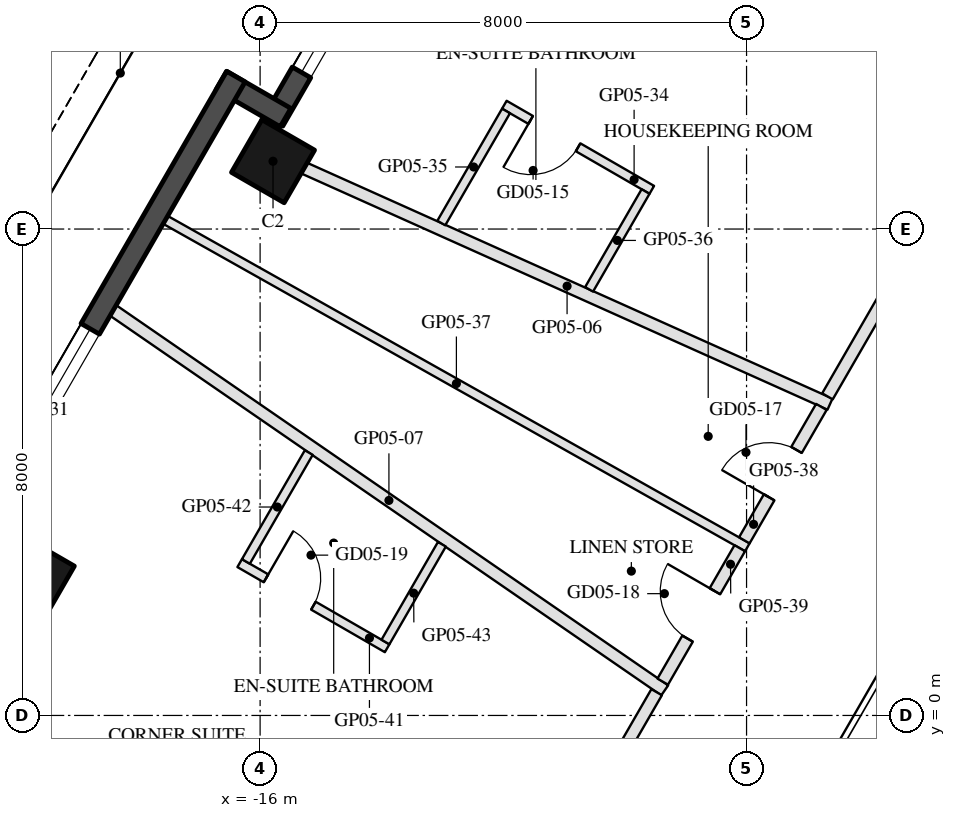
"""IFC4 building model, lengths in metres.
Left out: names, types, materials, properties, quantities, classifications, styles, units other than length and angle.
Written with IfcOpenShell. Run it as: python <this file> out.ifc"""

import sys

from ifc_helpers import new_model, si_unit, direction, frame, frame_2d, origin, origin_2d, place, context, subcontext, project, spatial, rectangle, hollow_rectangle, extrude, element, fill, save


model = new_model("IFC4")
c1 = context("Model", 3, precision=1e-05, world=origin(), true_north=direction((0.0, 1.0)))
c2 = subcontext(c1, "Body", "Model", "MODEL_VIEW")
j1 = project(units=[si_unit("LENGTHUNIT", "METRE"), si_unit("PLANEANGLEUNIT", "RADIAN")], contexts=[c1])
p1 = place(None, origin())
s1 = spatial("IfcSite", under=j1, at=p1, CompositionType="ELEMENT")
p2 = place(p1, origin())
s2 = spatial("IfcBuilding", under=s1, at=p2, CompositionType="ELEMENT")
p3 = place(p2, frame((0.0, 0.0, 79.8)))
s3 = spatial("IfcBuildingStorey", under=s2, at=p3, CompositionType="ELEMENT", Elevation=79.8)
for number, where, z_axis, x_axis in (
    (1, (-15.788, 9.115, 0.0), (0.0, 0.0, 1.0), (0.5, 0.866, 0.0)),
    (2, (-19.738, 2.273, 0.0), (0.0, 0.0, 1.0), (0.5, 0.866, 0.0)),
):
    element("IfcColumn", number, at=place(p3, frame(where, z_axis=z_axis, x_axis=x_axis)), inside=s3, PredefinedType="COLUMN", context=c2, shape_type="SweptSolid", body=[
        extrude(hollow_rectangle(XDim=1.0, YDim=1.0, WallThickness=0.045, at=origin_2d()), origin(), (0.0, 0.0, 1.0), 3.7),
    ])
p4 = place(p3, frame((-12.409, 15.617, 0.0), z_axis=(0.0, 0.0, 1.0), x_axis=(-0.500003597184, -0.866023326939, 0.0)))
e3 = element("IfcWall", 3, at=p4, inside=s3, PredefinedType="SOLIDWALL", context=c2, shape_type="SweptSolid", body=[
    extrude(rectangle(XDim=6.74, YDim=0.35, at=frame_2d((3.37, 0.0))), origin(), (0.0, 0.0, 1.0), 3.55),
])
p5 = place(p4, frame((0.32, 0.0, 0.3)))
e4 = element("IfcOpeningElement", 4, at=p5, cuts=e3, PredefinedType="OPENING", context=c2, shape_type="SweptSolid", body=[
    extrude(rectangle(XDim=2.6, YDim=2.65, at=frame_2d((1.3, 1.325))), frame((0.0, 0.185, 0.0), z_axis=(0.0, -1.0, 0.0), x_axis=(1.0, 0.0, 0.0)), (0.0, 0.0, 1.0), 0.37),
])
p6 = place(p4, frame((3.22, 0.0, 0.3)))
e5 = element("IfcOpeningElement", 5, at=p6, cuts=e3, PredefinedType="OPENING", context=c2, shape_type="SweptSolid", body=[
    extrude(rectangle(XDim=2.6, YDim=2.65, at=frame_2d((1.3, 1.325))), frame((0.0, 0.185, 0.0), z_axis=(0.0, -1.0, 0.0), x_axis=(1.0, 0.0, 0.0)), (0.0, 0.0, 1.0), 0.37),
])
p7 = place(p3, frame((-15.581, 9.833, 0.0), z_axis=(0.0, 0.0, 1.0), x_axis=(-0.866055662726, 0.499947586314, 0.0)))
e6 = element("IfcWall", 6, at=p7, inside=s3, PredefinedType="SOLIDWALL", context=c2, shape_type="SweptSolid", body=[
    extrude(rectangle(XDim=1.22, YDim=0.35, at=frame_2d((0.61, 0.0))), origin(), (0.0, 0.0, 1.0), 3.55),
])
p8 = place(p3, frame((-16.398, 10.507, 0.0), z_axis=(0.0, 0.0, 1.0), x_axis=(-0.499999142773, -0.866025898704, 0.0)))
e7 = element("IfcWall", 7, at=p8, inside=s3, PredefinedType="SOLIDWALL", context=c2, shape_type="SweptSolid", body=[
    extrude(rectangle(XDim=9.7, YDim=0.35, at=frame_2d((4.85, 0.0))), origin(), (0.0, 0.0, 1.0), 3.55),
])
p9 = place(p8, frame((4.79, 0.0, 0.3)))
e8 = element("IfcOpeningElement", 8, at=p9, cuts=e7, PredefinedType="OPENING", context=c2, shape_type="SweptSolid", body=[
    extrude(rectangle(XDim=3.1, YDim=2.65, at=frame_2d((1.55, 1.325))), frame((0.0, 0.185, 0.0), z_axis=(0.0, -1.0, 0.0), x_axis=(1.0, 0.0, 0.0)), (0.0, 0.0, 1.0), 0.37),
])
p10 = place(p3, frame((-15.275, 9.002, 0.0), z_axis=(0.0, 0.0, 1.0), x_axis=(0.912310970981, -0.409498097954, 0.0)))
e9 = element("IfcWall", 9, at=p10, inside=s3, PredefinedType="PARTITIONING", context=c2, shape_type="SweptSolid", body=[
    extrude(rectangle(XDim=9.479, YDim=0.2, at=frame_2d((4.74, 0.0))), origin(), (0.0, 0.0, 1.0), 2.95),
])
p11 = place(p3, frame((-18.417, 6.661, 0.0), z_axis=(0.0, 0.0, 1.0), x_axis=(0.823524858714, -0.56728018393, 0.0)))
e10 = element("IfcWall", 10, at=p11, inside=s3, PredefinedType="PARTITIONING", context=c2, shape_type="SweptSolid", body=[
    extrude(rectangle(XDim=11.015, YDim=0.2, at=frame_2d((5.507, 0.0))), origin(), (0.0, 0.0, 1.0), 2.95),
])
p12 = place(p3, frame((-6.669, 5.249, 0.0), z_axis=(0.0, 0.0, 1.0), x_axis=(0.499992114976, 0.866029956157, 0.0)))
e11 = element("IfcWall", 11, at=p12, inside=s3, PredefinedType="PARTITIONING", context=c2, shape_type="SweptSolid", body=[
    extrude(rectangle(XDim=8.778, YDim=0.2, at=frame_2d((4.389, 0.0))), origin(), (0.0, 0.0, 1.0), 2.95),
])
p13 = place(p12, frame((3.889, 0.0, 0.0)))
e12 = element("IfcOpeningElement", 12, at=p13, cuts=e11, PredefinedType="OPENING", context=c2, shape_type="SweptSolid", body=[
    extrude(rectangle(XDim=1.0, YDim=2.1, at=frame_2d((0.5, 1.05))), frame((0.0, 0.11, 0.0), z_axis=(0.0, -1.0, 0.0), x_axis=(1.0, 0.0, 0.0)), (0.0, 0.0, 1.0), 0.22),
])
p14 = place(p3, frame((-9.558, 8.645, 0.0), z_axis=(0.0, 0.0, 1.0), x_axis=(-0.866034573852, 0.49998411664, 0.0)))
e13 = element("IfcWall", 13, at=p14, inside=s3, PredefinedType="PARTITIONING", context=c2, shape_type="SweptSolid", body=[
    extrude(rectangle(XDim=2.8, YDim=0.15, at=frame_2d((1.4, 0.0))), origin(), (0.0, 0.0, 1.0), 3.55),
])
p15 = place(p14, frame((1.4, 0.0, 0.0)))
e14 = element("IfcOpeningElement", 14, at=p15, cuts=e13, PredefinedType="OPENING", context=c2, shape_type="SweptSolid", body=[
    extrude(rectangle(XDim=0.9, YDim=2.1, at=frame_2d((0.45, 1.05))), frame((0.0, 0.085, 0.0), z_axis=(0.0, -1.0, 0.0), x_axis=(1.0, 0.0, 0.0)), (0.0, 0.0, 1.0), 0.17),
])
p16 = place(p3, frame((-11.956, 9.942, 0.0), z_axis=(0.0, 0.0, 1.0), x_axis=(-0.50001378257, -0.866017446268, 0.0)))
e15 = element("IfcWall", 15, at=p16, inside=s3, PredefinedType="PARTITIONING", context=c2, shape_type="SweptSolid", body=[
    extrude(rectangle(XDim=2.128, YDim=0.15, at=frame_2d((1.064, 0.0))), origin(), (0.0, 0.0, 1.0), 3.55),
])
p17 = place(p3, frame((-9.661, 8.617, 0.0), z_axis=(0.0, 0.0, 1.0), x_axis=(-0.499984136491, -0.866034562392, 0.0)))
e16 = element("IfcWall", 16, at=p17, inside=s3, PredefinedType="PARTITIONING", context=c2, shape_type="SweptSolid", body=[
    extrude(rectangle(XDim=1.857, YDim=0.15, at=frame_2d((0.929, 0.0))), origin(), (0.0, 0.0, 1.0), 3.55),
])
p18 = place(p3, frame((-17.557, 8.15, 0.0), z_axis=(0.0, 0.0, 1.0), x_axis=(0.87154168957, -0.490321408202, 0.0)))
e17 = element("IfcWall", 17, at=p18, inside=s3, PredefinedType="PARTITIONING", context=c2, shape_type="SweptSolid", body=[
    extrude(rectangle(XDim=10.981, YDim=0.15, at=frame_2d((5.49, 0.0))), origin(), (0.0, 0.0, 1.0), 2.96),
])
p19 = place(p3, frame((-8.037, 2.88, 0.0), z_axis=(0.0, 0.0, 1.0), x_axis=(0.500025521233, 0.866010668592, 0.0)))
e18 = element("IfcWall", 18, at=p19, inside=s3, PredefinedType="PARTITIONING", context=c2, shape_type="SweptSolid", body=[
    extrude(rectangle(XDim=2.533, YDim=0.2, at=frame_2d((1.267, 0.0))), origin(), (0.0, 0.0, 1.0), 2.95),
])
p20 = place(p19, frame((0.817, 0.0, 0.0)))
e19 = element("IfcOpeningElement", 19, at=p20, cuts=e18, PredefinedType="OPENING", context=c2, shape_type="SweptSolid", body=[
    extrude(rectangle(XDim=0.9, YDim=2.1, at=frame_2d((0.45, 1.05))), frame((0.0, 0.11, 0.0), z_axis=(0.0, -1.0, 0.0), x_axis=(1.0, 0.0, 0.0)), (0.0, 0.0, 1.0), 0.22),
])
p21 = place(p3, frame((-9.378, 0.556, 0.0), z_axis=(0.0, 0.0, 1.0), x_axis=(0.499983796486, 0.866034758685, 0.0)))
e20 = element("IfcWall", 20, at=p21, inside=s3, PredefinedType="PARTITIONING", context=c2, shape_type="SweptSolid", body=[
    extrude(rectangle(XDim=2.534, YDim=0.2, at=frame_2d((1.267, 0.0))), origin(), (0.0, 0.0, 1.0), 2.95),
])
p22 = place(p21, frame((0.817, 0.0, 0.0)))
e21 = element("IfcOpeningElement", 21, at=p22, cuts=e20, PredefinedType="OPENING", context=c2, shape_type="SweptSolid", body=[
    extrude(rectangle(XDim=0.9, YDim=2.1, at=frame_2d((0.45, 1.05))), frame((0.0, 0.11, 0.0), z_axis=(0.0, -1.0, 0.0), x_axis=(1.0, 0.0, 0.0)), (0.0, 0.0, 1.0), 0.22),
])
p23 = place(p3, frame((-12.269, -4.45, 0.0), z_axis=(0.0, 0.0, 1.0), x_axis=(0.500016608416, 0.866015814699, 0.0)))
e22 = element("IfcWall", 22, at=p23, inside=s3, PredefinedType="PARTITIONING", context=c2, shape_type="SweptSolid", body=[
    extrude(rectangle(XDim=5.58, YDim=0.2, at=frame_2d((2.79, 0.0))), origin(), (0.0, 0.0, 1.0), 2.95),
])
p24 = place(p23, frame((2.29, 0.0, 0.0)))
e23 = element("IfcOpeningElement", 23, at=p24, cuts=e22, PredefinedType="OPENING", context=c2, shape_type="SweptSolid", body=[
    extrude(rectangle(XDim=1.0, YDim=2.1, at=frame_2d((0.5, 1.05))), frame((0.0, 0.11, 0.0), z_axis=(0.0, -1.0, 0.0), x_axis=(1.0, 0.0, 0.0)), (0.0, 0.0, 1.0), 0.22),
])
p25 = place(p3, frame((-16.336, 2.505, 0.0), z_axis=(0.0, 0.0, 1.0), x_axis=(0.866056369097, -0.49994636267, 0.0)))
e24 = element("IfcWall", 24, at=p25, inside=s3, PredefinedType="PARTITIONING", context=c2, shape_type="SweptSolid", body=[
    extrude(rectangle(XDim=2.8, YDim=0.15, at=frame_2d((1.4, 0.0))), origin(), (0.0, 0.0, 1.0), 3.55),
])
p26 = place(p25, frame((0.5, 0.0, 0.0)))
e25 = element("IfcOpeningElement", 25, at=p26, cuts=e24, PredefinedType="OPENING", context=c2, shape_type="SweptSolid", body=[
    extrude(rectangle(XDim=0.9, YDim=2.1, at=frame_2d((0.45, 1.05))), frame((0.0, 0.085, 0.0), z_axis=(0.0, -1.0, 0.0), x_axis=(1.0, 0.0, 0.0)), (0.0, 0.0, 1.0), 0.17),
])
p27 = place(p3, frame((-15.2, 4.323, 0.0), z_axis=(0.0, 0.0, 1.0), x_axis=(-0.499974592989, -0.866040072032, 0.0)))
e26 = element("IfcWall", 26, at=p27, inside=s3, PredefinedType="PARTITIONING", context=c2, shape_type="SweptSolid", body=[
    extrude(rectangle(XDim=2.067, YDim=0.15, at=frame_2d((1.034, 0.0))), origin(), (0.0, 0.0, 1.0), 2.95),
])
p28 = place(p3, frame((-13.01, 2.815, 0.0), z_axis=(0.0, 0.0, 1.0), x_axis=(-0.499972951856, -0.866041019474, 0.0)))
e27 = element("IfcWall", 27, at=p28, inside=s3, PredefinedType="PARTITIONING", context=c2, shape_type="SweptSolid", body=[
    extrude(rectangle(XDim=1.856, YDim=0.15, at=frame_2d((0.928, 0.0))), origin(), (0.0, 0.0, 1.0), 3.55),
])
p29 = place(p6, origin())
e28 = element("IfcWindow", 28, at=p29, inside=s3, PartitioningType="SINGLE_PANEL", PredefinedType="WINDOW", context=c2, shape_type="SweptSolid", body=[
    extrude(rectangle(XDim=2.6, YDim=2.65, at=frame_2d((1.3, 1.325))), frame((0.0, 0.03, 0.0), z_axis=(0.0, -1.0, 0.0), x_axis=(1.0, 0.0, 0.0)), (0.0, 0.0, 1.0), 0.06),
])
fill(e5, e28)
p30 = place(p9, origin())
e29 = element("IfcWindow", 29, at=p30, inside=s3, PartitioningType="SINGLE_PANEL", PredefinedType="WINDOW", context=c2, shape_type="SweptSolid", body=[
    extrude(rectangle(XDim=3.1, YDim=2.65, at=frame_2d((1.55, 1.325))), frame((0.0, 0.03, 0.0), z_axis=(0.0, -1.0, 0.0), x_axis=(1.0, 0.0, 0.0)), (0.0, 0.0, 1.0), 0.06),
])
fill(e8, e29)
p31 = place(p15, origin())
e30 = element("IfcDoor", 30, at=p31, inside=s3, OperationType="SINGLE_SWING_RIGHT", PredefinedType="DOOR", context=c2, shape_type="SweptSolid", body=[
    extrude(rectangle(XDim=0.9, YDim=2.1, at=frame_2d((0.45, 1.05))), frame((0.0, 0.025, 0.0), z_axis=(0.0, -1.0, 0.0), x_axis=(1.0, 0.0, 0.0)), (0.0, 0.0, 1.0), 0.05),
])
fill(e14, e30)
p32 = place(p20, origin())
e31 = element("IfcDoor", 31, at=p32, inside=s3, OperationType="SINGLE_SWING_LEFT", PredefinedType="DOOR", context=c2, shape_type="SweptSolid", body=[
    extrude(rectangle(XDim=0.9, YDim=2.1, at=frame_2d((0.45, 1.05))), frame((0.0, 0.025, 0.0), z_axis=(0.0, -1.0, 0.0), x_axis=(1.0, 0.0, 0.0)), (0.0, 0.0, 1.0), 0.05),
])
fill(e19, e31)
p33 = place(p22, origin())
e32 = element("IfcDoor", 32, at=p33, inside=s3, OperationType="SINGLE_SWING_RIGHT", PredefinedType="DOOR", context=c2, shape_type="SweptSolid", body=[
    extrude(rectangle(XDim=0.9, YDim=2.1, at=frame_2d((0.45, 1.05))), frame((0.0, 0.025, 0.0), z_axis=(0.0, -1.0, 0.0), x_axis=(1.0, 0.0, 0.0)), (0.0, 0.0, 1.0), 0.05),
])
fill(e21, e32)
p34 = place(p26, origin())
e33 = element("IfcDoor", 33, at=p34, inside=s3, OperationType="SINGLE_SWING_LEFT", PredefinedType="DOOR", context=c2, shape_type="SweptSolid", body=[
    extrude(rectangle(XDim=0.9, YDim=2.1, at=frame_2d((0.45, 1.05))), frame((0.0, 0.025, 0.0), z_axis=(0.0, -1.0, 0.0), x_axis=(1.0, 0.0, 0.0)), (0.0, 0.0, 1.0), 0.05),
])
fill(e25, e33)
save(model, sys.argv[1])
